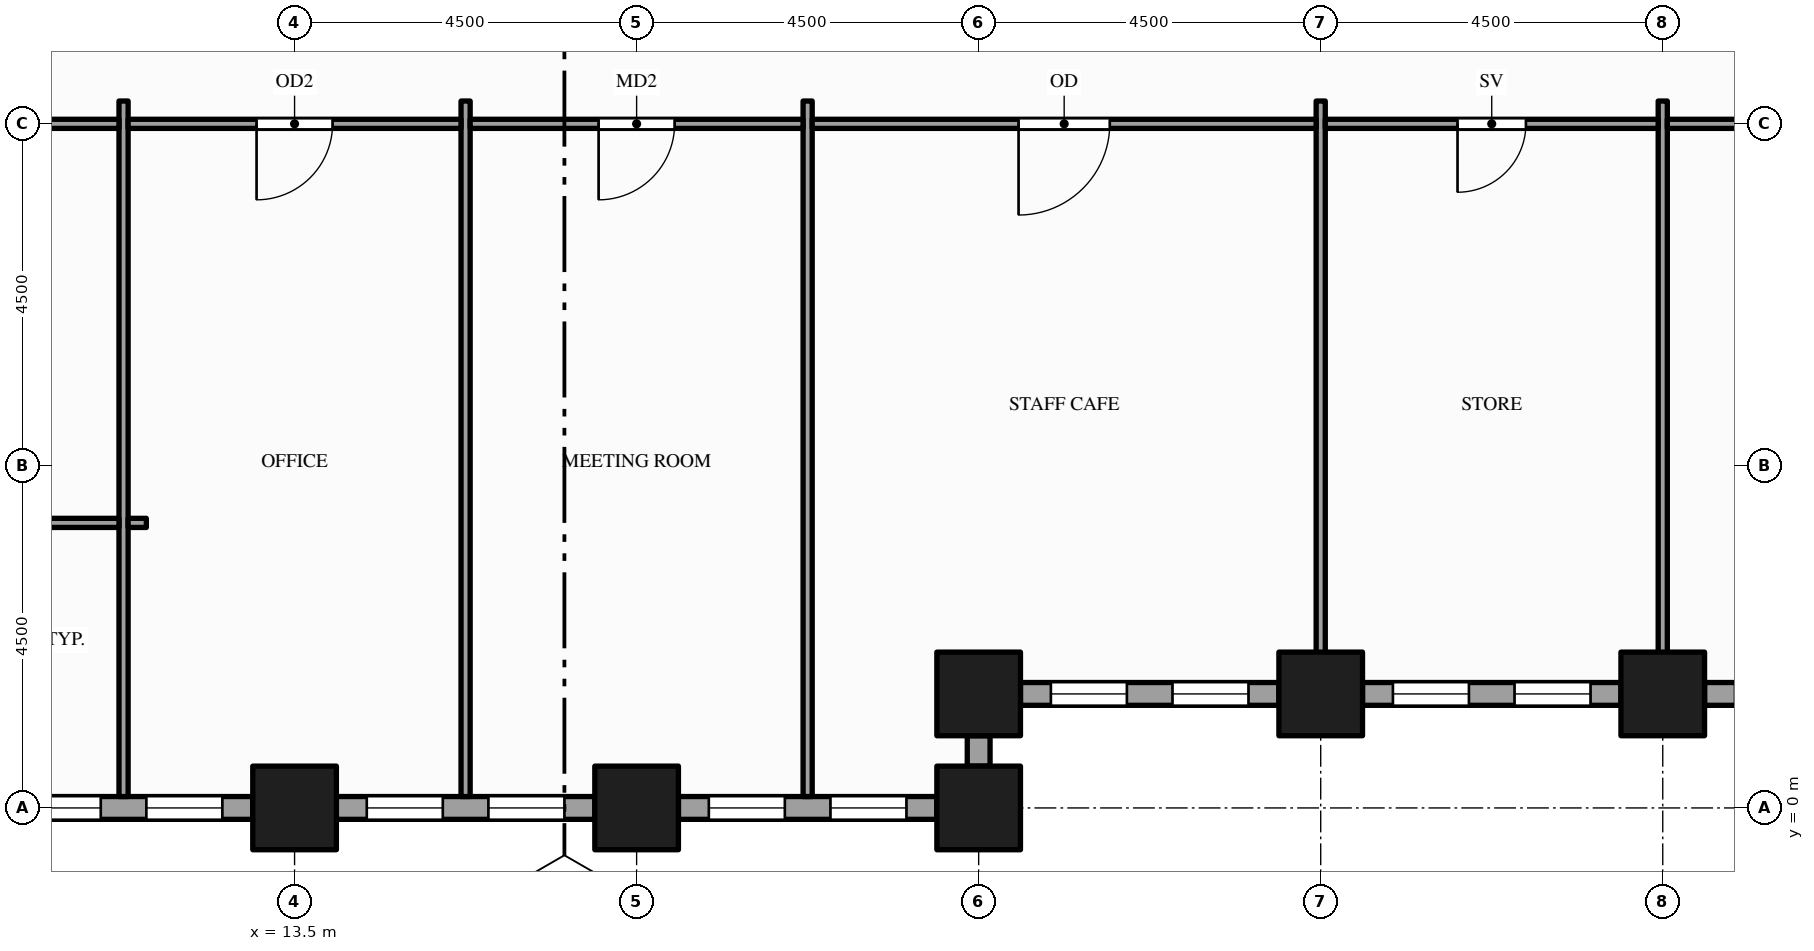
"""IFC4 building model, lengths in metres.
Left out: names, types, materials, properties, quantities, classifications, styles, units other than length and angle.
Written with IfcOpenShell. Run it as: python <this file> out.ifc"""

import sys

from ifc_helpers import new_model, si_unit, direction, frame, frame_2d, origin, origin_2d, place, context, subcontext, project, spatial, rectangle, hollow_rectangle, extrude, element, fill, save


model = new_model("IFC4")
c1 = context("Model", 3, precision=1e-05, world=origin(), true_north=direction((0.0, 1.0)))
c2 = subcontext(c1, "Body", "Model", "MODEL_VIEW")
j1 = project(units=[si_unit("LENGTHUNIT", "METRE"), si_unit("PLANEANGLEUNIT", "RADIAN")], contexts=[c1])
p1 = place(None, origin())
s1 = spatial("IfcSite", under=j1, at=p1, CompositionType="ELEMENT")
p2 = place(p1, origin())
s2 = spatial("IfcBuilding", under=s1, at=p2, CompositionType="ELEMENT")
p3 = place(p2, frame((0.0, 0.0, 69.0)))
s3 = spatial("IfcBuildingStorey", under=s2, at=p3, CompositionType="ELEMENT", Elevation=69.0)
for number, where, z_axis, x_axis in (
    (1, (13.5, 0.0, -0.15), (0.0, 0.0, 1.0), (1.0, 0.0, 0.0)),
    (2, (18.0, 0.0, -0.15), (0.0, 0.0, 1.0), (1.0, 0.0, 0.0)),
    (3, (22.5, 0.0, -0.15), (0.0, 0.0, 1.0), (1.0, 0.0, 0.0)),
    (4, (22.5, 1.5, -0.15), (0.0, 0.0, 1.0), (1.0, 0.0, 0.0)),
    (5, (27.0, 1.5, -0.15), (0.0, 0.0, 1.0), (1.0, 0.0, 0.0)),
    (6, (31.5, 1.5, -0.15), (0.0, 0.0, 1.0), (1.0, 0.0, 0.0)),
):
    element("IfcColumn", number, at=place(p3, frame(where, z_axis=z_axis, x_axis=x_axis)), inside=s3, PredefinedType="COLUMN", context=c2, shape_type="SweptSolid", body=[
        extrude(hollow_rectangle(XDim=1.1, YDim=1.1, WallThickness=0.06, at=origin_2d()), origin(), (0.0, 0.0, 1.0), 4.0),
    ])
p4 = place(p3, frame((9.55, 0.0, 0.0), z_axis=(0.0, 0.0, 1.0), x_axis=(1.0, 0.0, 0.0)))
e7 = element("IfcWall", 7, at=p4, inside=s3, PredefinedType="STANDARD", context=c2, shape_type="SweptSolid", body=[
    extrude(rectangle(XDim=3.4, YDim=0.3, at=frame_2d((1.7, 0.0))), origin(), (0.0, 0.0, 1.0), 3.144),
])
p5 = place(p4, frame((0.4, 0.0, 0.9)))
e8 = element("IfcOpeningElement", 8, at=p5, cuts=e7, PredefinedType="OPENING", context=c2, shape_type="SweptSolid", body=[
    extrude(rectangle(XDim=1.0, YDim=2.0, at=frame_2d((0.5, 1.0))), frame((0.0, 0.16, 0.0), z_axis=(0.0, -1.0, 0.0), x_axis=(1.0, 0.0, 0.0)), (0.0, 0.0, 1.0), 0.32),
])
p6 = place(p4, frame((2.0, 0.0, 0.9)))
e9 = element("IfcOpeningElement", 9, at=p6, cuts=e7, PredefinedType="OPENING", context=c2, shape_type="SweptSolid", body=[
    extrude(rectangle(XDim=1.0, YDim=2.0, at=frame_2d((0.5, 1.0))), frame((0.0, 0.16, 0.0), z_axis=(0.0, -1.0, 0.0), x_axis=(1.0, 0.0, 0.0)), (0.0, 0.0, 1.0), 0.32),
])
p7 = place(p3, frame((14.05, 0.0, 0.0), z_axis=(0.0, 0.0, 1.0), x_axis=(1.0, 0.0, 0.0)))
e10 = element("IfcWall", 10, at=p7, inside=s3, PredefinedType="STANDARD", context=c2, shape_type="SweptSolid", body=[
    extrude(rectangle(XDim=3.4, YDim=0.3, at=frame_2d((1.7, 0.0))), origin(), (0.0, 0.0, 1.0), 3.144),
])
p8 = place(p7, frame((0.4, 0.0, 0.9)))
e11 = element("IfcOpeningElement", 11, at=p8, cuts=e10, PredefinedType="OPENING", context=c2, shape_type="SweptSolid", body=[
    extrude(rectangle(XDim=1.0, YDim=2.0, at=frame_2d((0.5, 1.0))), frame((0.0, 0.16, 0.0), z_axis=(0.0, -1.0, 0.0), x_axis=(1.0, 0.0, 0.0)), (0.0, 0.0, 1.0), 0.32),
])
p9 = place(p7, frame((2.0, 0.0, 0.9)))
e12 = element("IfcOpeningElement", 12, at=p9, cuts=e10, PredefinedType="OPENING", context=c2, shape_type="SweptSolid", body=[
    extrude(rectangle(XDim=1.0, YDim=2.0, at=frame_2d((0.5, 1.0))), frame((0.0, 0.16, 0.0), z_axis=(0.0, -1.0, 0.0), x_axis=(1.0, 0.0, 0.0)), (0.0, 0.0, 1.0), 0.32),
])
p10 = place(p3, frame((18.55, 0.0, 0.0), z_axis=(0.0, 0.0, 1.0), x_axis=(1.0, 0.0, 0.0)))
e13 = element("IfcWall", 13, at=p10, inside=s3, PredefinedType="STANDARD", context=c2, shape_type="SweptSolid", body=[
    extrude(rectangle(XDim=3.4, YDim=0.3, at=frame_2d((1.7, 0.0))), origin(), (0.0, 0.0, 1.0), 3.144),
])
p11 = place(p10, frame((0.4, 0.0, 0.9)))
e14 = element("IfcOpeningElement", 14, at=p11, cuts=e13, PredefinedType="OPENING", context=c2, shape_type="SweptSolid", body=[
    extrude(rectangle(XDim=1.0, YDim=2.0, at=frame_2d((0.5, 1.0))), frame((0.0, 0.16, 0.0), z_axis=(0.0, -1.0, 0.0), x_axis=(1.0, 0.0, 0.0)), (0.0, 0.0, 1.0), 0.32),
])
p12 = place(p10, frame((2.0, 0.0, 0.9)))
e15 = element("IfcOpeningElement", 15, at=p12, cuts=e13, PredefinedType="OPENING", context=c2, shape_type="SweptSolid", body=[
    extrude(rectangle(XDim=1.0, YDim=2.0, at=frame_2d((0.5, 1.0))), frame((0.0, 0.16, 0.0), z_axis=(0.0, -1.0, 0.0), x_axis=(1.0, 0.0, 0.0)), (0.0, 0.0, 1.0), 0.32),
])
p13 = place(p3, frame((22.5, 0.55, 0.0), z_axis=(0.0, 0.0, 1.0), x_axis=(0.0, 1.0, 0.0)))
e16 = element("IfcWall", 16, at=p13, inside=s3, PredefinedType="STANDARD", context=c2, shape_type="SweptSolid", body=[
    extrude(rectangle(XDim=0.4, YDim=0.3, at=frame_2d((0.2, 0.0))), origin(), (0.0, 0.0, 1.0), 3.144),
])
p14 = place(p3, frame((23.05, 1.5, 0.0), z_axis=(0.0, 0.0, 1.0), x_axis=(1.0, 0.0, 0.0)))
e17 = element("IfcWall", 17, at=p14, inside=s3, PredefinedType="STANDARD", context=c2, shape_type="SweptSolid", body=[
    extrude(rectangle(XDim=3.4, YDim=0.3, at=frame_2d((1.7, 0.0))), origin(), (0.0, 0.0, 1.0), 3.144),
])
p15 = place(p14, frame((0.4, 0.0, 0.9)))
e18 = element("IfcOpeningElement", 18, at=p15, cuts=e17, PredefinedType="OPENING", context=c2, shape_type="SweptSolid", body=[
    extrude(rectangle(XDim=1.0, YDim=2.0, at=frame_2d((0.5, 1.0))), frame((0.0, 0.16, 0.0), z_axis=(0.0, -1.0, 0.0), x_axis=(1.0, 0.0, 0.0)), (0.0, 0.0, 1.0), 0.32),
])
p16 = place(p14, frame((2.0, 0.0, 0.9)))
e19 = element("IfcOpeningElement", 19, at=p16, cuts=e17, PredefinedType="OPENING", context=c2, shape_type="SweptSolid", body=[
    extrude(rectangle(XDim=1.0, YDim=2.0, at=frame_2d((0.5, 1.0))), frame((0.0, 0.16, 0.0), z_axis=(0.0, -1.0, 0.0), x_axis=(1.0, 0.0, 0.0)), (0.0, 0.0, 1.0), 0.32),
])
p17 = place(p3, frame((27.55, 1.5, 0.0), z_axis=(0.0, 0.0, 1.0), x_axis=(1.0, 0.0, 0.0)))
e20 = element("IfcWall", 20, at=p17, inside=s3, PredefinedType="STANDARD", context=c2, shape_type="SweptSolid", body=[
    extrude(rectangle(XDim=3.4, YDim=0.3, at=frame_2d((1.7, 0.0))), origin(), (0.0, 0.0, 1.0), 3.144),
])
p18 = place(p17, frame((0.4, 0.0, 0.9)))
e21 = element("IfcOpeningElement", 21, at=p18, cuts=e20, PredefinedType="OPENING", context=c2, shape_type="SweptSolid", body=[
    extrude(rectangle(XDim=1.0, YDim=2.0, at=frame_2d((0.5, 1.0))), frame((0.0, 0.16, 0.0), z_axis=(0.0, -1.0, 0.0), x_axis=(1.0, 0.0, 0.0)), (0.0, 0.0, 1.0), 0.32),
])
p19 = place(p17, frame((2.0, 0.0, 0.9)))
e22 = element("IfcOpeningElement", 22, at=p19, cuts=e20, PredefinedType="OPENING", context=c2, shape_type="SweptSolid", body=[
    extrude(rectangle(XDim=1.0, YDim=2.0, at=frame_2d((0.5, 1.0))), frame((0.0, 0.16, 0.0), z_axis=(0.0, -1.0, 0.0), x_axis=(1.0, 0.0, 0.0)), (0.0, 0.0, 1.0), 0.32),
])
p20 = place(p3, frame((32.05, 1.5, 0.0), z_axis=(0.0, 0.0, 1.0), x_axis=(1.0, 0.0, 0.0)))
e23 = element("IfcWall", 23, at=p20, inside=s3, PredefinedType="STANDARD", context=c2, shape_type="SweptSolid", body=[
    extrude(rectangle(XDim=3.4, YDim=0.3, at=frame_2d((1.7, 0.0))), origin(), (0.0, 0.0, 1.0), 3.144),
])
p21 = place(p20, frame((0.4, 0.0, 0.9)))
e24 = element("IfcOpeningElement", 24, at=p21, cuts=e23, PredefinedType="OPENING", context=c2, shape_type="SweptSolid", body=[
    extrude(rectangle(XDim=1.0, YDim=2.0, at=frame_2d((0.5, 1.0))), frame((0.0, 0.16, 0.0), z_axis=(0.0, -1.0, 0.0), x_axis=(1.0, 0.0, 0.0)), (0.0, 0.0, 1.0), 0.32),
])
p22 = place(p20, frame((2.0, 0.0, 0.9)))
e25 = element("IfcOpeningElement", 25, at=p22, cuts=e23, PredefinedType="OPENING", context=c2, shape_type="SweptSolid", body=[
    extrude(rectangle(XDim=1.0, YDim=2.0, at=frame_2d((0.5, 1.0))), frame((0.0, 0.16, 0.0), z_axis=(0.0, -1.0, 0.0), x_axis=(1.0, 0.0, 0.0)), (0.0, 0.0, 1.0), 0.32),
])
for number, where, z_axis, x_axis in (
    (26, (11.25, 0.15, 0.0), (0.0, 0.0, 1.0), (0.0, 1.0, 0.0)),
    (27, (15.75, 0.15, 0.0), (0.0, 0.0, 1.0), (0.0, 1.0, 0.0)),
    (28, (20.25, 0.15, 0.0), (0.0, 0.0, 1.0), (0.0, 1.0, 0.0)),
):
    element("IfcWall", number, at=place(p3, frame(where, z_axis=z_axis, x_axis=x_axis)), inside=s3, PredefinedType="PARTITIONING", context=c2, shape_type="SweptSolid", body=[
        extrude(rectangle(XDim=9.15, YDim=0.12, at=frame_2d((4.575, 0.0))), origin(), (0.0, 0.0, 1.0), 2.938),
    ])
for number, where, z_axis, x_axis in (
    (29, (27.0, 1.65, 0.0), (0.0, 0.0, 1.0), (0.0, 1.0, 0.0)),
    (30, (31.5, 1.65, 0.0), (0.0, 0.0, 1.0), (0.0, 1.0, 0.0)),
):
    element("IfcWall", number, at=place(p3, frame(where, z_axis=z_axis, x_axis=x_axis)), inside=s3, PredefinedType="PARTITIONING", context=c2, shape_type="SweptSolid", body=[
        extrude(rectangle(XDim=7.65, YDim=0.12, at=frame_2d((3.825, 0.0))), origin(), (0.0, 0.0, 1.0), 2.938),
    ])
p23 = place(p3, frame((9.125, 3.75, 0.0), z_axis=(0.0, 0.0, 1.0), x_axis=(1.0, 0.0, 0.0)))
e31 = element("IfcWall", 31, at=p23, inside=s3, PredefinedType="PARTITIONING", context=c2, shape_type="SweptSolid", body=[
    extrude(rectangle(XDim=2.065, YDim=0.12, at=frame_2d((1.032, 0.0))), origin(), (0.0, 0.0, 1.0), 2.938),
])
p24 = place(p3, frame((11.31, 3.75, 0.0), z_axis=(0.0, 0.0, 1.0), x_axis=(1.0, 0.0, 0.0)))
e32 = element("IfcWall", 32, at=p24, inside=s3, PredefinedType="PARTITIONING", context=c2, shape_type="SweptSolid", body=[
    extrude(rectangle(XDim=0.24, YDim=0.12, at=frame_2d((0.12, 0.0))), origin(), (0.0, 0.0, 1.0), 2.938),
])
p25 = place(p3, frame((0.15, 9.0, 0.0), z_axis=(0.0, 0.0, 1.0), x_axis=(1.0, 0.0, 0.0)))
e33 = element("IfcWall", 33, at=p25, inside=s3, PredefinedType="PARTITIONING", context=c2, shape_type="SweptSolid", body=[
    extrude(rectangle(XDim=11.04, YDim=0.12, at=frame_2d((5.52, 0.0))), origin(), (0.0, 0.0, 1.0), 2.938),
])
p26 = place(p25, frame((4.93, 0.0, 0.0)))
e34 = element("IfcOpeningElement", 34, at=p26, cuts=e33, PredefinedType="OPENING", context=c2, shape_type="SweptSolid", body=[
    extrude(rectangle(XDim=1.2, YDim=2.1, at=frame_2d((0.6, 1.05))), frame((0.0, 0.07, 0.0), z_axis=(0.0, -1.0, 0.0), x_axis=(1.0, 0.0, 0.0)), (0.0, 0.0, 1.0), 0.14),
])
p27 = place(p3, frame((11.31, 9.0, 0.0), z_axis=(0.0, 0.0, 1.0), x_axis=(1.0, 0.0, 0.0)))
e35 = element("IfcWall", 35, at=p27, inside=s3, PredefinedType="PARTITIONING", context=c2, shape_type="SweptSolid", body=[
    extrude(rectangle(XDim=4.38, YDim=0.12, at=frame_2d((2.19, 0.0))), origin(), (0.0, 0.0, 1.0), 2.938),
])
p28 = place(p27, frame((1.69, 0.0, 0.0)))
e36 = element("IfcOpeningElement", 36, at=p28, cuts=e35, PredefinedType="OPENING", context=c2, shape_type="SweptSolid", body=[
    extrude(rectangle(XDim=1.0, YDim=2.1, at=frame_2d((0.5, 1.05))), frame((0.0, 0.07, 0.0), z_axis=(0.0, -1.0, 0.0), x_axis=(1.0, 0.0, 0.0)), (0.0, 0.0, 1.0), 0.14),
])
p29 = place(p3, frame((15.81, 9.0, 0.0), z_axis=(0.0, 0.0, 1.0), x_axis=(1.0, 0.0, 0.0)))
e37 = element("IfcWall", 37, at=p29, inside=s3, PredefinedType="PARTITIONING", context=c2, shape_type="SweptSolid", body=[
    extrude(rectangle(XDim=4.38, YDim=0.12, at=frame_2d((2.19, 0.0))), origin(), (0.0, 0.0, 1.0), 2.938),
])
p30 = place(p29, frame((1.69, 0.0, 0.0)))
e38 = element("IfcOpeningElement", 38, at=p30, cuts=e37, PredefinedType="OPENING", context=c2, shape_type="SweptSolid", body=[
    extrude(rectangle(XDim=1.0, YDim=2.1, at=frame_2d((0.5, 1.05))), frame((0.0, 0.07, 0.0), z_axis=(0.0, -1.0, 0.0), x_axis=(1.0, 0.0, 0.0)), (0.0, 0.0, 1.0), 0.14),
])
p31 = place(p3, frame((20.31, 9.0, 0.0), z_axis=(0.0, 0.0, 1.0), x_axis=(1.0, 0.0, 0.0)))
e39 = element("IfcWall", 39, at=p31, inside=s3, PredefinedType="PARTITIONING", context=c2, shape_type="SweptSolid", body=[
    extrude(rectangle(XDim=6.63, YDim=0.12, at=frame_2d((3.315, 0.0))), origin(), (0.0, 0.0, 1.0), 2.938),
])
p32 = place(p31, frame((2.715, 0.0, 0.0)))
e40 = element("IfcOpeningElement", 40, at=p32, cuts=e39, PredefinedType="OPENING", context=c2, shape_type="SweptSolid", body=[
    extrude(rectangle(XDim=1.2, YDim=2.1, at=frame_2d((0.6, 1.05))), frame((0.0, 0.07, 0.0), z_axis=(0.0, -1.0, 0.0), x_axis=(1.0, 0.0, 0.0)), (0.0, 0.0, 1.0), 0.14),
])
p33 = place(p3, frame((27.06, 9.0, 0.0), z_axis=(0.0, 0.0, 1.0), x_axis=(1.0, 0.0, 0.0)))
e41 = element("IfcWall", 41, at=p33, inside=s3, PredefinedType="PARTITIONING", context=c2, shape_type="SweptSolid", body=[
    extrude(rectangle(XDim=4.38, YDim=0.12, at=frame_2d((2.19, 0.0))), origin(), (0.0, 0.0, 1.0), 2.938),
])
p34 = place(p33, frame((1.74, 0.0, 0.0)))
e42 = element("IfcOpeningElement", 42, at=p34, cuts=e41, PredefinedType="OPENING", context=c2, shape_type="SweptSolid", body=[
    extrude(rectangle(XDim=0.9, YDim=2.1, at=frame_2d((0.45, 1.05))), frame((0.0, 0.07, 0.0), z_axis=(0.0, -1.0, 0.0), x_axis=(1.0, 0.0, 0.0)), (0.0, 0.0, 1.0), 0.14),
])
p35 = place(p3, frame((31.56, 9.0, 0.0), z_axis=(0.0, 0.0, 1.0), x_axis=(1.0, 0.0, 0.0)))
e43 = element("IfcWall", 43, at=p35, inside=s3, PredefinedType="PARTITIONING", context=c2, shape_type="SweptSolid", body=[
    extrude(rectangle(XDim=6.63, YDim=0.12, at=frame_2d((3.315, 0.0))), origin(), (0.0, 0.0, 1.0), 2.938),
])
p36 = place(p35, frame((2.865, 0.0, 0.0)))
e44 = element("IfcOpeningElement", 44, at=p36, cuts=e43, PredefinedType="OPENING", context=c2, shape_type="SweptSolid", body=[
    extrude(rectangle(XDim=0.9, YDim=2.1, at=frame_2d((0.45, 1.05))), frame((0.0, 0.07, 0.0), z_axis=(0.0, -1.0, 0.0), x_axis=(1.0, 0.0, 0.0)), (0.0, 0.0, 1.0), 0.14),
])
p37 = place(p5, origin())
e45 = element("IfcWindow", 45, at=p37, inside=s3, PartitioningType="SINGLE_PANEL", PredefinedType="WINDOW", context=c2, shape_type="SweptSolid", body=[
    extrude(rectangle(XDim=1.0, YDim=2.0, at=frame_2d((0.5, 1.0))), frame((0.0, 0.03, 0.0), z_axis=(0.0, -1.0, 0.0), x_axis=(1.0, 0.0, 0.0)), (0.0, 0.0, 1.0), 0.06),
])
fill(e8, e45)
p38 = place(p6, origin())
e46 = element("IfcWindow", 46, at=p38, inside=s3, PartitioningType="SINGLE_PANEL", PredefinedType="WINDOW", context=c2, shape_type="SweptSolid", body=[
    extrude(rectangle(XDim=1.0, YDim=2.0, at=frame_2d((0.5, 1.0))), frame((0.0, 0.03, 0.0), z_axis=(0.0, -1.0, 0.0), x_axis=(1.0, 0.0, 0.0)), (0.0, 0.0, 1.0), 0.06),
])
fill(e9, e46)
p39 = place(p8, origin())
e47 = element("IfcWindow", 47, at=p39, inside=s3, PartitioningType="SINGLE_PANEL", PredefinedType="WINDOW", context=c2, shape_type="SweptSolid", body=[
    extrude(rectangle(XDim=1.0, YDim=2.0, at=frame_2d((0.5, 1.0))), frame((0.0, 0.03, 0.0), z_axis=(0.0, -1.0, 0.0), x_axis=(1.0, 0.0, 0.0)), (0.0, 0.0, 1.0), 0.06),
])
fill(e11, e47)
p40 = place(p9, origin())
e48 = element("IfcWindow", 48, at=p40, inside=s3, PartitioningType="SINGLE_PANEL", PredefinedType="WINDOW", context=c2, shape_type="SweptSolid", body=[
    extrude(rectangle(XDim=1.0, YDim=2.0, at=frame_2d((0.5, 1.0))), frame((0.0, 0.03, 0.0), z_axis=(0.0, -1.0, 0.0), x_axis=(1.0, 0.0, 0.0)), (0.0, 0.0, 1.0), 0.06),
])
fill(e12, e48)
p41 = place(p11, origin())
e49 = element("IfcWindow", 49, at=p41, inside=s3, PartitioningType="SINGLE_PANEL", PredefinedType="WINDOW", context=c2, shape_type="SweptSolid", body=[
    extrude(rectangle(XDim=1.0, YDim=2.0, at=frame_2d((0.5, 1.0))), frame((0.0, 0.03, 0.0), z_axis=(0.0, -1.0, 0.0), x_axis=(1.0, 0.0, 0.0)), (0.0, 0.0, 1.0), 0.06),
])
fill(e14, e49)
p42 = place(p12, origin())
e50 = element("IfcWindow", 50, at=p42, inside=s3, PartitioningType="SINGLE_PANEL", PredefinedType="WINDOW", context=c2, shape_type="SweptSolid", body=[
    extrude(rectangle(XDim=1.0, YDim=2.0, at=frame_2d((0.5, 1.0))), frame((0.0, 0.03, 0.0), z_axis=(0.0, -1.0, 0.0), x_axis=(1.0, 0.0, 0.0)), (0.0, 0.0, 1.0), 0.06),
])
fill(e15, e50)
p43 = place(p15, origin())
e51 = element("IfcWindow", 51, at=p43, inside=s3, PartitioningType="SINGLE_PANEL", PredefinedType="WINDOW", context=c2, shape_type="SweptSolid", body=[
    extrude(rectangle(XDim=1.0, YDim=2.0, at=frame_2d((0.5, 1.0))), frame((0.0, 0.03, 0.0), z_axis=(0.0, -1.0, 0.0), x_axis=(1.0, 0.0, 0.0)), (0.0, 0.0, 1.0), 0.06),
])
fill(e18, e51)
p44 = place(p16, origin())
e52 = element("IfcWindow", 52, at=p44, inside=s3, PartitioningType="SINGLE_PANEL", PredefinedType="WINDOW", context=c2, shape_type="SweptSolid", body=[
    extrude(rectangle(XDim=1.0, YDim=2.0, at=frame_2d((0.5, 1.0))), frame((0.0, 0.03, 0.0), z_axis=(0.0, -1.0, 0.0), x_axis=(1.0, 0.0, 0.0)), (0.0, 0.0, 1.0), 0.06),
])
fill(e19, e52)
p45 = place(p18, origin())
e53 = element("IfcWindow", 53, at=p45, inside=s3, PartitioningType="SINGLE_PANEL", PredefinedType="WINDOW", context=c2, shape_type="SweptSolid", body=[
    extrude(rectangle(XDim=1.0, YDim=2.0, at=frame_2d((0.5, 1.0))), frame((0.0, 0.03, 0.0), z_axis=(0.0, -1.0, 0.0), x_axis=(1.0, 0.0, 0.0)), (0.0, 0.0, 1.0), 0.06),
])
fill(e21, e53)
p46 = place(p19, origin())
e54 = element("IfcWindow", 54, at=p46, inside=s3, PartitioningType="SINGLE_PANEL", PredefinedType="WINDOW", context=c2, shape_type="SweptSolid", body=[
    extrude(rectangle(XDim=1.0, YDim=2.0, at=frame_2d((0.5, 1.0))), frame((0.0, 0.03, 0.0), z_axis=(0.0, -1.0, 0.0), x_axis=(1.0, 0.0, 0.0)), (0.0, 0.0, 1.0), 0.06),
])
fill(e22, e54)
p47 = place(p28, origin())
e55 = element("IfcDoor", 55, at=p47, inside=s3, OperationType="SINGLE_SWING_LEFT", PredefinedType="DOOR", context=c2, shape_type="SweptSolid", body=[
    extrude(rectangle(XDim=1.0, YDim=2.1, at=frame_2d((0.5, 1.05))), frame((0.0, 0.025, 0.0), z_axis=(0.0, -1.0, 0.0), x_axis=(1.0, 0.0, 0.0)), (0.0, 0.0, 1.0), 0.05),
])
fill(e36, e55)
p48 = place(p30, origin())
e56 = element("IfcDoor", 56, at=p48, inside=s3, OperationType="SINGLE_SWING_LEFT", PredefinedType="DOOR", context=c2, shape_type="SweptSolid", body=[
    extrude(rectangle(XDim=1.0, YDim=2.1, at=frame_2d((0.5, 1.05))), frame((0.0, 0.025, 0.0), z_axis=(0.0, -1.0, 0.0), x_axis=(1.0, 0.0, 0.0)), (0.0, 0.0, 1.0), 0.05),
])
fill(e38, e56)
p49 = place(p32, origin())
e57 = element("IfcDoor", 57, at=p49, inside=s3, OperationType="SINGLE_SWING_LEFT", PredefinedType="DOOR", context=c2, shape_type="SweptSolid", body=[
    extrude(rectangle(XDim=1.2, YDim=2.1, at=frame_2d((0.6, 1.05))), frame((0.0, 0.025, 0.0), z_axis=(0.0, -1.0, 0.0), x_axis=(1.0, 0.0, 0.0)), (0.0, 0.0, 1.0), 0.05),
])
fill(e40, e57)
p50 = place(p34, origin())
e58 = element("IfcDoor", 58, at=p50, inside=s3, OperationType="SINGLE_SWING_LEFT", PredefinedType="DOOR", context=c2, shape_type="SweptSolid", body=[
    extrude(rectangle(XDim=0.9, YDim=2.1, at=frame_2d((0.45, 1.05))), frame((0.0, 0.025, 0.0), z_axis=(0.0, -1.0, 0.0), x_axis=(1.0, 0.0, 0.0)), (0.0, 0.0, 1.0), 0.05),
])
fill(e42, e58)
save(model, sys.argv[1])
